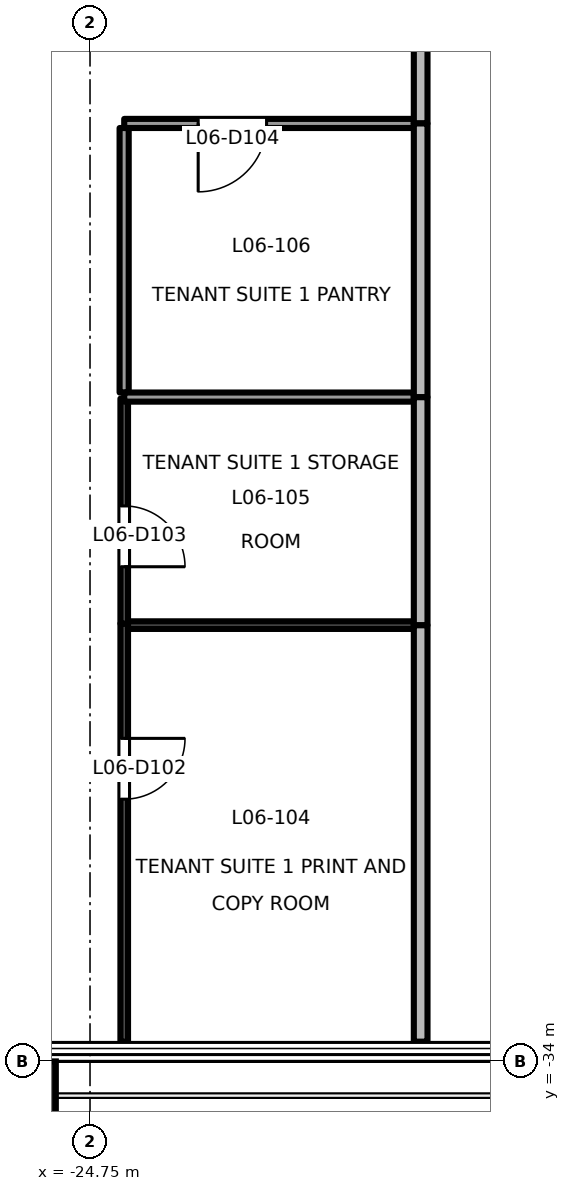
"""IFC4 building model, lengths in metres.
Left out: names, types, materials, properties, quantities, classifications, styles, units other than length and angle.
Written with IfcOpenShell. Run it as: python <this file> out.ifc"""

import sys

from ifc_helpers import new_model, si_unit, direction, frame, frame_2d, origin, origin_2d, place, context, subcontext, project, spatial, rectangle, extrude, element, fill, save


model = new_model("IFC4")
c1 = context("Model", 3, precision=1e-05, world=origin(), true_north=direction((0.0, 1.0)))
c2 = subcontext(c1, "Body", "Model", "MODEL_VIEW")
j1 = project(units=[si_unit("LENGTHUNIT", "METRE"), si_unit("PLANEANGLEUNIT", "RADIAN")], contexts=[c1])
p1 = place(None, origin())
s1 = spatial("IfcSite", under=j1, at=p1, CompositionType="ELEMENT")
p2 = place(p1, origin())
s2 = spatial("IfcBuilding", under=s1, at=p2, CompositionType="ELEMENT")
p3 = place(p2, frame((0.0, 0.0, 32.4)))
s3 = spatial("IfcBuildingStorey", under=s2, at=p3, CompositionType="ELEMENT", Elevation=32.4)
p4 = place(p3, frame((-26.1, -34.9, -0.2), z_axis=(0.0, 0.0, 1.0), x_axis=(1.0, 0.0, 0.0)))
e1 = element("IfcColumn", 1, at=p4, inside=s3, PredefinedType="COLUMN", context=c2, shape_type="SweptSolid", body=[
    extrude(rectangle(XDim=1.8, YDim=1.8, at=origin_2d()), origin(), (0.0, 0.0, 1.0), 4.1),
])
p5 = place(p3, frame((-24.3, -28.24, 0.0), z_axis=(0.0, 0.0, 1.0), x_axis=(0.0, -1.0, 0.0)))
e2 = element("IfcWall", 2, at=p5, inside=s3, PredefinedType="PARTITIONING", context=c2, shape_type="SweptSolid", body=[
    extrude(rectangle(XDim=5.5, YDim=0.1, at=frame_2d((2.75, 0.0))), origin(), (0.0, 0.0, 1.0), 3.9),
])
p6 = place(p5, frame((1.51, 0.0, 0.0)))
e3 = element("IfcOpeningElement", 3, at=p6, cuts=e2, PredefinedType="OPENING", context=c2, shape_type="SweptSolid", body=[
    extrude(rectangle(XDim=0.8, YDim=2.1, at=frame_2d((0.4, 1.05))), frame((0.0, 0.061, 0.0), z_axis=(0.0, -1.0, 0.0), x_axis=(1.0, 0.0, 0.0)), (0.0, 0.0, 1.0), 0.121),
])
p7 = place(p3, frame((-24.3, -25.28, 0.0), z_axis=(0.0, 0.0, 1.0), x_axis=(0.0, -1.0, 0.0)))
e4 = element("IfcWall", 4, at=p7, inside=s3, PredefinedType="PARTITIONING", context=c2, shape_type="SweptSolid", body=[
    extrude(rectangle(XDim=2.96, YDim=0.1, at=frame_2d((1.48, 0.0))), origin(), (0.0, 0.0, 1.0), 3.3),
])
p8 = place(p7, frame((1.412, 0.0, 0.0)))
e5 = element("IfcOpeningElement", 5, at=p8, cuts=e4, PredefinedType="OPENING", context=c2, shape_type="SweptSolid", body=[
    extrude(rectangle(XDim=0.8, YDim=2.1, at=frame_2d((0.4, 1.05))), frame((0.0, 0.061, 0.0), z_axis=(0.0, -1.0, 0.0), x_axis=(1.0, 0.0, 0.0)), (0.0, 0.0, 1.0), 0.121),
])
p9 = place(p3, frame((-24.301, -21.72, 0.0), z_axis=(0.0, 0.0, 1.0), x_axis=(0.0, -1.0, 0.0)))
e6 = element("IfcWall", 6, at=p9, inside=s3, PredefinedType="PARTITIONING", context=c2, shape_type="SweptSolid", body=[
    extrude(rectangle(XDim=3.48, YDim=0.12, at=frame_2d((1.74, 0.0))), origin(), (0.0, 0.0, 1.0), 3.3),
])
p10 = place(p3, frame((-20.49, -21.66, 0.0), z_axis=(0.0, 0.0, 1.0), x_axis=(-1.0, 0.0, 0.0)))
e7 = element("IfcWall", 7, at=p10, inside=s3, PredefinedType="PARTITIONING", context=c2, shape_type="SweptSolid", body=[
    extrude(rectangle(XDim=3.81, YDim=0.12, at=frame_2d((1.905, 0.0))), origin(), (0.0, 0.0, 1.0), 3.9),
])
p11 = place(p10, frame((1.937, 0.0, 0.0)))
e8 = element("IfcOpeningElement", 8, at=p11, cuts=e7, PredefinedType="OPENING", context=c2, shape_type="SweptSolid", body=[
    extrude(rectangle(XDim=0.9, YDim=2.1, at=frame_2d((0.45, 1.05))), frame((0.0, 0.071, 0.0), z_axis=(0.0, -1.0, 0.0), x_axis=(1.0, 0.0, 0.0)), (0.0, 0.0, 1.0), 0.141),
])
p12 = place(p3, frame((-20.4, -15.66, 0.0), z_axis=(0.0, 0.0, 1.0), x_axis=(0.0, -1.0, 0.0)))
e9 = element("IfcWall", 9, at=p12, inside=s3, PredefinedType="PARTITIONING", context=c2, shape_type="SweptSolid", body=[
    extrude(rectangle(XDim=6.0, YDim=0.18, at=frame_2d((3.0, 0.0))), origin(), (0.0, 0.0, 1.0), 3.3),
])
p13 = place(p3, frame((-24.25, -28.26, 0.0), z_axis=(0.0, 0.0, 1.0), x_axis=(1.0, 0.0, 0.0)))
e10 = element("IfcWall", 10, at=p13, inside=s3, PredefinedType="PARTITIONING", context=c2, shape_type="SweptSolid", body=[
    extrude(rectangle(XDim=3.76, YDim=0.1, at=frame_2d((1.88, 0.0))), origin(), (0.0, 0.0, 1.0), 3.9),
])
p14 = place(p3, frame((-20.4, -28.26, 0.0), z_axis=(0.0, 0.0, 1.0), x_axis=(0.0, -1.0, 0.0)))
e11 = element("IfcWall", 11, at=p14, inside=s3, PredefinedType="PARTITIONING", context=c2, shape_type="SweptSolid", body=[
    extrude(rectangle(XDim=5.48, YDim=0.18, at=frame_2d((2.74, 0.0))), origin(), (0.0, 0.0, 1.0), 3.9),
])
p15 = place(p3, frame((-24.3, -25.26, 0.0), z_axis=(0.0, 0.0, 1.0), x_axis=(1.0, 0.0, 0.0)))
e12 = element("IfcWall", 12, at=p15, inside=s3, PredefinedType="PARTITIONING", context=c2, shape_type="SweptSolid", body=[
    extrude(rectangle(XDim=3.81, YDim=0.12, at=frame_2d((1.905, 0.0))), origin(), (0.0, 0.0, 1.0), 3.9),
])
p16 = place(p3, frame((-20.4, -25.26, 0.0), z_axis=(0.0, 0.0, 1.0), x_axis=(0.0, -1.0, 0.0)))
e13 = element("IfcWall", 13, at=p16, inside=s3, PredefinedType="PARTITIONING", context=c2, shape_type="SweptSolid", body=[
    extrude(rectangle(XDim=3.0, YDim=0.18, at=frame_2d((1.5, 0.0))), origin(), (0.0, 0.0, 1.0), 3.3),
])
p17 = place(p3, frame((-20.4, -21.66, 0.0), z_axis=(0.0, 0.0, 1.0), x_axis=(0.0, -1.0, 0.0)))
e14 = element("IfcWall", 14, at=p17, inside=s3, PredefinedType="PARTITIONING", context=c2, shape_type="SweptSolid", body=[
    extrude(rectangle(XDim=3.6, YDim=0.18, at=frame_2d((1.8, 0.0))), origin(), (0.0, 0.0, 1.0), 3.3),
])
p18 = place(p6, origin())
e15 = element("IfcDoor", 15, at=p18, inside=s3, OperationType="SINGLE_SWING_LEFT", PredefinedType="DOOR", context=c2, shape_type="SweptSolid", body=[
    extrude(rectangle(XDim=0.8, YDim=2.1, at=frame_2d((0.4, 1.05))), frame((0.0, 0.025, 0.0), z_axis=(0.0, -1.0, 0.0), x_axis=(1.0, 0.0, 0.0)), (0.0, 0.0, 1.0), 0.05),
])
fill(e3, e15)
p19 = place(p8, origin())
e16 = element("IfcDoor", 16, at=p19, inside=s3, OperationType="SINGLE_SWING_RIGHT", PredefinedType="DOOR", context=c2, shape_type="SweptSolid", body=[
    extrude(rectangle(XDim=0.8, YDim=2.1, at=frame_2d((0.4, 1.05))), frame((0.0, 0.025, 0.0), z_axis=(0.0, -1.0, 0.0), x_axis=(1.0, 0.0, 0.0)), (0.0, 0.0, 1.0), 0.05),
])
fill(e5, e16)
p20 = place(p11, origin())
e17 = element("IfcDoor", 17, at=p20, inside=s3, OperationType="SINGLE_SWING_RIGHT", PredefinedType="DOOR", context=c2, shape_type="SweptSolid", body=[
    extrude(rectangle(XDim=0.9, YDim=2.1, at=frame_2d((0.45, 1.05))), frame((0.0, 0.025, 0.0), z_axis=(0.0, -1.0, 0.0), x_axis=(1.0, 0.0, 0.0)), (0.0, 0.0, 1.0), 0.05),
])
fill(e8, e17)
save(model, sys.argv[1])
